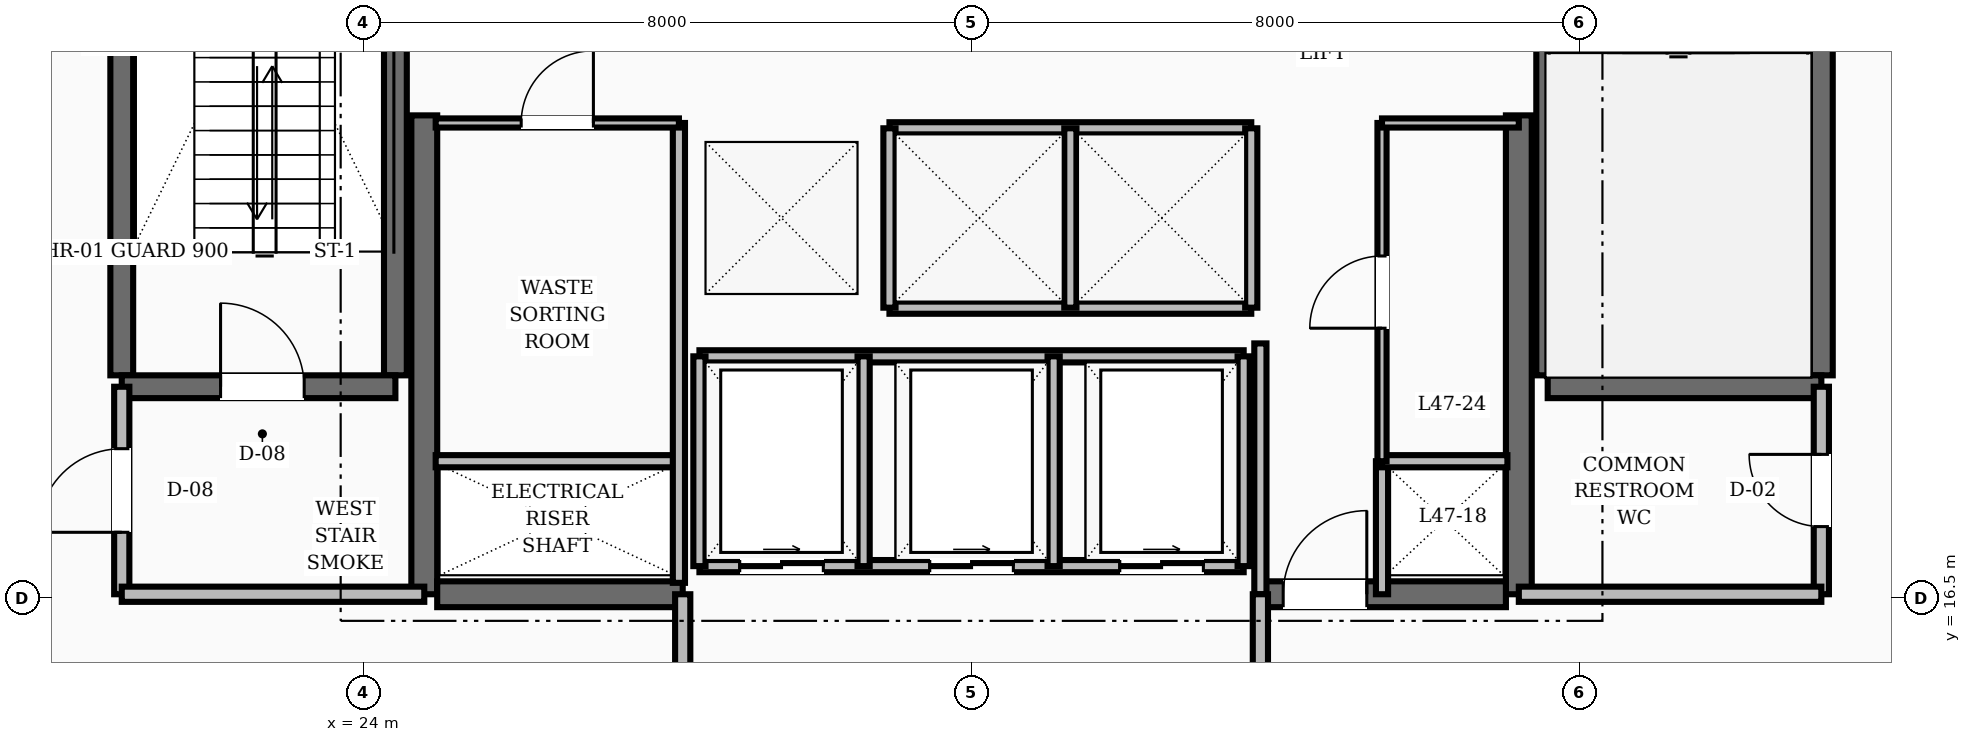
"""IFC4 building model, lengths in metres.
Left out: names, types, materials, properties, quantities, classifications, styles, units other than length and angle.
Written with IfcOpenShell. Run it as: python <this file> out.ifc"""

import sys

from ifc_helpers import new_model, si_unit, direction, frame, frame_2d, origin, place, context, subcontext, project, spatial, rectangle, extrude, element, fill, save


model = new_model("IFC4")
c1 = context("Model", 3, precision=1e-05, world=origin(), true_north=direction((0.0, 1.0)))
c2 = subcontext(c1, "Body", "Model", "MODEL_VIEW")
j1 = project(units=[si_unit("LENGTHUNIT", "METRE"), si_unit("PLANEANGLEUNIT", "RADIAN")], contexts=[c1])
p1 = place(None, origin())
s1 = spatial("IfcSite", under=j1, at=p1, CompositionType="ELEMENT")
p2 = place(p1, origin())
s2 = spatial("IfcBuilding", under=s1, at=p2, CompositionType="ELEMENT")
p3 = place(p2, frame((0.0, 0.0, 182.0)))
s3 = spatial("IfcBuildingStorey", under=s2, at=p3, CompositionType="ELEMENT", Elevation=182.0)
for number, where, z_axis, x_axis in (
    (1, (24.8, 16.55, 0.0), (0.0, 0.0, 1.0), (0.0, 1.0, 0.0)),
    (2, (39.2, 16.55, 0.0), (0.0, 0.0, 1.0), (0.0, 1.0, 0.0)),
):
    element("IfcWall", number, at=place(p3, frame(where, z_axis=z_axis, x_axis=x_axis)), inside=s3, PredefinedType="SHEAR", context=c2, shape_type="SweptSolid", body=[
        extrude(rectangle(XDim=6.3, YDim=0.34, at=frame_2d((3.15, 0.0))), origin(), (0.0, 0.0, 1.0), 3.6),
    ])
p4 = place(p3, frame((24.97, 16.55, 0.0), z_axis=(0.0, 0.0, 1.0), x_axis=(1.0, 0.0, 0.0)))
e3 = element("IfcWall", 3, at=p4, inside=s3, PredefinedType="SHEAR", context=c2, shape_type="SweptSolid", body=[
    extrude(rectangle(XDim=3.23, YDim=0.34, at=frame_2d((1.615, 0.0))), origin(), (0.0, 0.0, 1.0), 3.6),
])
p5 = place(p3, frame((35.8, 16.55, 0.0), z_axis=(0.0, 0.0, 1.0), x_axis=(1.0, 0.0, 0.0)))
e4 = element("IfcWall", 4, at=p5, inside=s3, PredefinedType="SHEAR", context=c2, shape_type="SweptSolid", body=[
    extrude(rectangle(XDim=3.23, YDim=0.34, at=frame_2d((1.615, 0.0))), origin(), (0.0, 0.0, 1.0), 3.6),
])
p6 = place(p5, frame((0.3, 0.0, 0.0)))
e5 = element("IfcOpeningElement", 5, at=p6, cuts=e4, PredefinedType="OPENING", context=c2, shape_type="SweptSolid", body=[
    extrude(rectangle(XDim=1.1, YDim=2.1, at=frame_2d((0.55, 1.05))), frame((0.0, 0.18, 0.0), z_axis=(0.0, -1.0, 0.0), x_axis=(1.0, 0.0, 0.0)), (0.0, 0.0, 1.0), 0.36),
])
for number, where, z_axis, x_axis in (
    (6, (20.82, 19.43, 0.0), (0.0, 0.0, 1.0), (0.0, 1.0, 0.0)),
    (7, (24.42, 19.43, 0.0), (0.0, 0.0, 1.0), (0.0, 1.0, 0.0)),
):
    element("IfcWall", number, at=place(p3, frame(where, z_axis=z_axis, x_axis=x_axis)), inside=s3, PredefinedType="SHEAR", context=c2, shape_type="SweptSolid", body=[
        extrude(rectangle(XDim=8.74, YDim=0.3, at=frame_2d((4.37, 0.0))), origin(), (0.0, 0.0, 1.0), 3.6),
    ])
p7 = place(p3, frame((20.82, 19.28, 0.0), z_axis=(0.0, 0.0, 1.0), x_axis=(1.0, 0.0, 0.0)))
e8 = element("IfcWall", 8, at=p7, inside=s3, PredefinedType="SHEAR", context=c2, shape_type="SweptSolid", body=[
    extrude(rectangle(XDim=3.6, YDim=0.3, at=frame_2d((1.8, 0.0))), origin(), (0.0, 0.0, 1.0), 3.6),
])
p8 = place(p7, frame((1.3, 0.0, 0.0)))
e9 = element("IfcOpeningElement", 9, at=p8, cuts=e8, PredefinedType="OPENING", context=c2, shape_type="SweptSolid", body=[
    extrude(rectangle(XDim=1.1, YDim=2.1, at=frame_2d((0.55, 1.05))), frame((0.0, 0.16, 0.0), z_axis=(0.0, -1.0, 0.0), x_axis=(1.0, 0.0, 0.0)), (0.0, 0.0, 1.0), 0.32),
])
for number, where, z_axis, x_axis in (
    (10, (43.18, 19.43, 0.0), (0.0, 0.0, 1.0), (0.0, 1.0, 0.0)),
    (11, (39.58, 19.43, 0.0), (0.0, 0.0, 1.0), (0.0, 1.0, 0.0)),
):
    element("IfcWall", number, at=place(p3, frame(where, z_axis=z_axis, x_axis=x_axis)), inside=s3, PredefinedType="SHEAR", context=c2, shape_type="SweptSolid", body=[
        extrude(rectangle(XDim=8.74, YDim=0.3, at=frame_2d((4.37, 0.0))), origin(), (0.0, 0.0, 1.0), 3.6),
    ])
p9 = place(p3, frame((39.58, 19.28, 0.0), z_axis=(0.0, 0.0, 1.0), x_axis=(1.0, 0.0, 0.0)))
e12 = element("IfcWall", 12, at=p9, inside=s3, PredefinedType="SHEAR", context=c2, shape_type="SweptSolid", body=[
    extrude(rectangle(XDim=3.6, YDim=0.3, at=frame_2d((1.8, 0.0))), origin(), (0.0, 0.0, 1.0), 3.6),
])
p10 = place(p3, frame((20.82, 16.55, 0.0), z_axis=(0.0, 0.0, 1.0), x_axis=(0.0, 1.0, 0.0)))
e13 = element("IfcWall", 13, at=p10, inside=s3, PredefinedType="SOLIDWALL", context=c2, shape_type="SweptSolid", body=[
    extrude(rectangle(XDim=2.73, YDim=0.2, at=frame_2d((1.365, 0.0))), origin(), (0.0, 0.0, 1.0), 2.8),
])
p11 = place(p10, frame((0.815, 0.0, 0.0)))
e14 = element("IfcOpeningElement", 14, at=p11, cuts=e13, PredefinedType="OPENING", context=c2, shape_type="SweptSolid", body=[
    extrude(rectangle(XDim=1.1, YDim=2.1, at=frame_2d((0.55, 1.05))), frame((0.0, 0.11, 0.0), z_axis=(0.0, -1.0, 0.0), x_axis=(1.0, 0.0, 0.0)), (0.0, 0.0, 1.0), 0.22),
])
p12 = place(p3, frame((20.82, 16.55, 0.0), z_axis=(0.0, 0.0, 1.0), x_axis=(1.0, 0.0, 0.0)))
e15 = element("IfcWall", 15, at=p12, inside=s3, PredefinedType="SOLIDWALL", context=c2, shape_type="SweptSolid", body=[
    extrude(rectangle(XDim=3.98, YDim=0.2, at=frame_2d((1.99, 0.0))), origin(), (0.0, 0.0, 1.0), 2.8),
])
p13 = place(p3, frame((43.18, 16.55, 0.0), z_axis=(0.0, 0.0, 1.0), x_axis=(0.0, 1.0, 0.0)))
e16 = element("IfcWall", 16, at=p13, inside=s3, PredefinedType="SOLIDWALL", context=c2, shape_type="SweptSolid", body=[
    extrude(rectangle(XDim=2.73, YDim=0.2, at=frame_2d((1.365, 0.0))), origin(), (0.0, 0.0, 1.0), 2.8),
])
p14 = place(p13, frame((0.89, 0.0, 0.0)))
e17 = element("IfcOpeningElement", 17, at=p14, cuts=e16, PredefinedType="OPENING", context=c2, shape_type="SweptSolid", body=[
    extrude(rectangle(XDim=0.95, YDim=2.1, at=frame_2d((0.475, 1.05))), frame((0.0, 0.11, 0.0), z_axis=(0.0, -1.0, 0.0), x_axis=(1.0, 0.0, 0.0)), (0.0, 0.0, 1.0), 0.22),
])
p15 = place(p3, frame((39.2, 16.55, 0.0), z_axis=(0.0, 0.0, 1.0), x_axis=(1.0, 0.0, 0.0)))
e18 = element("IfcWall", 18, at=p15, inside=s3, PredefinedType="SOLIDWALL", context=c2, shape_type="SweptSolid", body=[
    extrude(rectangle(XDim=3.98, YDim=0.2, at=frame_2d((1.99, 0.0))), origin(), (0.0, 0.0, 1.0), 2.8),
])
p16 = place(p3, frame((35.8, 16.55, 0.0), z_axis=(0.0, 0.0, 1.0), x_axis=(0.0, 1.0, 0.0)))
e19 = element("IfcWall", 19, at=p16, inside=s3, PredefinedType="SOLIDWALL", context=c2, shape_type="SweptSolid", body=[
    extrude(rectangle(XDim=3.3, YDim=0.16, at=frame_2d((1.65, 0.0))), origin(), (0.0, 0.0, 1.0), 2.8),
])
p17 = place(p3, frame((37.4, 16.55, 0.0), z_axis=(0.0, 0.0, 1.0), x_axis=(0.0, 1.0, 0.0)))
e20 = element("IfcWall", 20, at=p17, inside=s3, PredefinedType="SOLIDWALL", context=c2, shape_type="SweptSolid", body=[
    extrude(rectangle(XDim=1.75, YDim=0.16, at=frame_2d((0.875, 0.0))), origin(), (0.0, 0.0, 1.0), 2.8),
])
for number, where, z_axis, x_axis in (
    (21, (28.2, 14.35, 0.0), (0.0, 0.0, 1.0), (0.0, 1.0, 0.0)),
    (22, (35.8, 14.35, 0.0), (0.0, 0.0, 1.0), (0.0, 1.0, 0.0)),
):
    element("IfcWall", number, at=place(p3, frame(where, z_axis=z_axis, x_axis=x_axis)), inside=s3, PredefinedType="SOLIDWALL", context=c2, shape_type="SweptSolid", body=[
        extrude(rectangle(XDim=2.2, YDim=0.2, at=frame_2d((1.1, 0.0))), origin(), (0.0, 0.0, 1.0), 2.8),
    ])
for number, where, z_axis, x_axis in (
    (23, (30.92, 22.68, 0.0), (0.0, 0.0, 1.0), (1.0, 0.0, 0.0)),
    (24, (30.92, 20.32, 0.0), (0.0, 0.0, 1.0), (1.0, 0.0, 0.0)),
):
    element("IfcWall", number, at=place(p3, frame(where, z_axis=z_axis, x_axis=x_axis)), inside=s3, PredefinedType="SOLIDWALL", context=c2, shape_type="SweptSolid", body=[
        extrude(rectangle(XDim=4.76, YDim=0.16, at=frame_2d((2.38, 0.0))), origin(), (0.0, 0.0, 1.0), 2.8),
    ])
for number, where, z_axis, x_axis in (
    (25, (30.92, 20.32, 0.0), (0.0, 0.0, 1.0), (0.0, 1.0, 0.0)),
    (26, (33.3, 20.32, 0.0), (0.0, 0.0, 1.0), (0.0, 1.0, 0.0)),
    (27, (35.68, 20.32, 0.0), (0.0, 0.0, 1.0), (0.0, 1.0, 0.0)),
):
    element("IfcWall", number, at=place(p3, frame(where, z_axis=z_axis, x_axis=x_axis)), inside=s3, PredefinedType="SOLIDWALL", context=c2, shape_type="SweptSolid", body=[
        extrude(rectangle(XDim=2.36, YDim=0.16, at=frame_2d((1.18, 0.0))), origin(), (0.0, 0.0, 1.0), 2.8),
    ])
p18 = place(p3, frame((28.42, 16.92, 0.0), z_axis=(0.0, 0.0, 1.0), x_axis=(1.0, 0.0, 0.0)))
e28 = element("IfcWall", 28, at=p18, inside=s3, PredefinedType="SOLIDWALL", context=c2, shape_type="SweptSolid", body=[
    extrude(rectangle(XDim=7.16, YDim=0.16, at=frame_2d((3.58, 0.0))), origin(), (0.0, 0.0, 1.0), 2.8),
])
p19 = place(p18, frame((0.53, 0.0, 0.0)))
e29 = element("IfcOpeningElement", 29, at=p19, cuts=e28, PredefinedType="OPENING", context=c2, shape_type="SweptSolid", body=[
    extrude(rectangle(XDim=1.1, YDim=2.15, at=frame_2d((0.55, 1.075))), frame((0.0, 0.09, 0.0), z_axis=(0.0, -1.0, 0.0), x_axis=(1.0, 0.0, 0.0)), (0.0, 0.0, 1.0), 0.18),
])
p20 = place(p18, frame((3.03, 0.0, 0.0)))
e30 = element("IfcOpeningElement", 30, at=p20, cuts=e28, PredefinedType="OPENING", context=c2, shape_type="SweptSolid", body=[
    extrude(rectangle(XDim=1.1, YDim=2.15, at=frame_2d((0.55, 1.075))), frame((0.0, 0.09, 0.0), z_axis=(0.0, -1.0, 0.0), x_axis=(1.0, 0.0, 0.0)), (0.0, 0.0, 1.0), 0.18),
])
p21 = place(p18, frame((5.53, 0.0, 0.0)))
e31 = element("IfcOpeningElement", 31, at=p21, cuts=e28, PredefinedType="OPENING", context=c2, shape_type="SweptSolid", body=[
    extrude(rectangle(XDim=1.1, YDim=2.15, at=frame_2d((0.55, 1.075))), frame((0.0, 0.09, 0.0), z_axis=(0.0, -1.0, 0.0), x_axis=(1.0, 0.0, 0.0)), (0.0, 0.0, 1.0), 0.18),
])
p22 = place(p3, frame((28.42, 19.68, 0.0), z_axis=(0.0, 0.0, 1.0), x_axis=(1.0, 0.0, 0.0)))
e32 = element("IfcWall", 32, at=p22, inside=s3, PredefinedType="SOLIDWALL", context=c2, shape_type="SweptSolid", body=[
    extrude(rectangle(XDim=7.16, YDim=0.16, at=frame_2d((3.58, 0.0))), origin(), (0.0, 0.0, 1.0), 2.8),
])
for number, where, z_axis, x_axis in (
    (33, (28.42, 16.92, 0.0), (0.0, 0.0, 1.0), (0.0, 1.0, 0.0)),
    (34, (30.58, 16.92, 0.0), (0.0, 0.0, 1.0), (0.0, 1.0, 0.0)),
    (35, (33.08, 16.92, 0.0), (0.0, 0.0, 1.0), (0.0, 1.0, 0.0)),
    (36, (35.58, 16.92, 0.0), (0.0, 0.0, 1.0), (0.0, 1.0, 0.0)),
):
    element("IfcWall", number, at=place(p3, frame(where, z_axis=z_axis, x_axis=x_axis)), inside=s3, PredefinedType="SOLIDWALL", context=c2, shape_type="SweptSolid", body=[
        extrude(rectangle(XDim=2.76, YDim=0.16, at=frame_2d((1.38, 0.0))), origin(), (0.0, 0.0, 1.0), 2.8),
    ])
p23 = place(p3, frame((24.95, 18.3, 0.0), z_axis=(0.0, 0.0, 1.0), x_axis=(1.0, 0.0, 0.0)))
e37 = element("IfcWall", 37, at=p23, inside=s3, PredefinedType="SOLIDWALL", context=c2, shape_type="SweptSolid", body=[
    extrude(rectangle(XDim=3.2, YDim=0.16, at=frame_2d((1.6, 0.0))), origin(), (0.0, 0.0, 1.0), 2.8),
])
p24 = place(p3, frame((28.15, 16.7, 0.0), z_axis=(0.0, 0.0, 1.0), x_axis=(0.0, 1.0, 0.0)))
e38 = element("IfcWall", 38, at=p24, inside=s3, PredefinedType="SOLIDWALL", context=c2, shape_type="SweptSolid", body=[
    extrude(rectangle(XDim=6.05, YDim=0.16, at=frame_2d((3.025, 0.0))), origin(), (0.0, 0.0, 1.0), 2.8),
])
p25 = place(p3, frame((37.4, 18.3, 0.0), z_axis=(0.0, 0.0, 1.0), x_axis=(1.0, 0.0, 0.0)))
e39 = element("IfcWall", 39, at=p25, inside=s3, PredefinedType="SOLIDWALL", context=c2, shape_type="SweptSolid", body=[
    extrude(rectangle(XDim=1.65, YDim=0.16, at=frame_2d((0.825, 0.0))), origin(), (0.0, 0.0, 1.0), 2.8),
])
p26 = place(p3, frame((24.95, 22.75, 0.0), z_axis=(0.0, 0.0, 1.0), x_axis=(1.0, 0.0, 0.0)))
e40 = element("IfcWall", 40, at=p26, inside=s3, PredefinedType="PARTITIONING", context=c2, shape_type="SweptSolid", body=[
    extrude(rectangle(XDim=3.2, YDim=0.12, at=frame_2d((1.6, 0.0))), origin(), (0.0, 0.0, 1.0), 2.8),
])
p27 = place(p26, frame((1.125, 0.0, 0.0)))
e41 = element("IfcOpeningElement", 41, at=p27, cuts=e40, PredefinedType="OPENING", context=c2, shape_type="SweptSolid", body=[
    extrude(rectangle(XDim=0.95, YDim=2.1, at=frame_2d((0.475, 1.05))), frame((0.0, 0.07, 0.0), z_axis=(0.0, -1.0, 0.0), x_axis=(1.0, 0.0, 0.0)), (0.0, 0.0, 1.0), 0.14),
])
p28 = place(p3, frame((37.4, 18.3, 0.0), z_axis=(0.0, 0.0, 1.0), x_axis=(0.0, 1.0, 0.0)))
e42 = element("IfcWall", 42, at=p28, inside=s3, PredefinedType="PARTITIONING", context=c2, shape_type="SweptSolid", body=[
    extrude(rectangle(XDim=4.45, YDim=0.12, at=frame_2d((2.225, 0.0))), origin(), (0.0, 0.0, 1.0), 2.8),
])
p29 = place(p28, frame((1.75, 0.0, 0.0)))
e43 = element("IfcOpeningElement", 43, at=p29, cuts=e42, PredefinedType="OPENING", context=c2, shape_type="SweptSolid", body=[
    extrude(rectangle(XDim=0.95, YDim=2.1, at=frame_2d((0.475, 1.05))), frame((0.0, 0.07, 0.0), z_axis=(0.0, -1.0, 0.0), x_axis=(1.0, 0.0, 0.0)), (0.0, 0.0, 1.0), 0.14),
])
p30 = place(p3, frame((37.4, 22.75, 0.0), z_axis=(0.0, 0.0, 1.0), x_axis=(1.0, 0.0, 0.0)))
e44 = element("IfcWall", 44, at=p30, inside=s3, PredefinedType="PARTITIONING", context=c2, shape_type="SweptSolid", body=[
    extrude(rectangle(XDim=1.8, YDim=0.12, at=frame_2d((0.9, 0.0))), origin(), (0.0, 0.0, 1.0), 2.8),
])
p31 = place(p8, origin())
e45 = element("IfcDoor", 45, at=p31, inside=s3, OperationType="SINGLE_SWING_LEFT", PredefinedType="DOOR", context=c2, shape_type="SweptSolid", body=[
    extrude(rectangle(XDim=1.1, YDim=2.1, at=frame_2d((0.55, 1.05))), frame((0.0, 0.025, 0.0), z_axis=(0.0, -1.0, 0.0), x_axis=(1.0, 0.0, 0.0)), (0.0, 0.0, 1.0), 0.05),
])
fill(e9, e45)
p32 = place(p11, origin())
e46 = element("IfcDoor", 46, at=p32, inside=s3, OperationType="SINGLE_SWING_LEFT", PredefinedType="DOOR", context=c2, shape_type="SweptSolid", body=[
    extrude(rectangle(XDim=1.1, YDim=2.1, at=frame_2d((0.55, 1.05))), frame((0.0, 0.025, 0.0), z_axis=(0.0, -1.0, 0.0), x_axis=(1.0, 0.0, 0.0)), (0.0, 0.0, 1.0), 0.05),
])
fill(e14, e46)
p33 = place(p14, origin())
e47 = element("IfcDoor", 47, at=p33, inside=s3, OperationType="SINGLE_SWING_RIGHT", PredefinedType="DOOR", context=c2, shape_type="SweptSolid", body=[
    extrude(rectangle(XDim=0.95, YDim=2.1, at=frame_2d((0.475, 1.05))), frame((0.0, 0.025, 0.0), z_axis=(0.0, -1.0, 0.0), x_axis=(1.0, 0.0, 0.0)), (0.0, 0.0, 1.0), 0.05),
])
fill(e17, e47)
p34 = place(p6, origin())
e48 = element("IfcDoor", 48, at=p34, inside=s3, OperationType="SINGLE_SWING_RIGHT", PredefinedType="DOOR", context=c2, shape_type="SweptSolid", body=[
    extrude(rectangle(XDim=1.1, YDim=2.1, at=frame_2d((0.55, 1.05))), frame((0.0, 0.025, 0.0), z_axis=(0.0, -1.0, 0.0), x_axis=(1.0, 0.0, 0.0)), (0.0, 0.0, 1.0), 0.05),
])
fill(e5, e48)
p35 = place(p19, origin())
e49 = element("IfcDoor", 49, at=p35, inside=s3, OperationType="SLIDING_TO_RIGHT", PredefinedType="DOOR", context=c2, shape_type="SweptSolid", body=[
    extrude(rectangle(XDim=1.1, YDim=2.15, at=frame_2d((0.55, 1.075))), frame((0.0, 0.025, 0.0), z_axis=(0.0, -1.0, 0.0), x_axis=(1.0, 0.0, 0.0)), (0.0, 0.0, 1.0), 0.05),
])
fill(e29, e49)
p36 = place(p20, origin())
e50 = element("IfcDoor", 50, at=p36, inside=s3, OperationType="SLIDING_TO_RIGHT", PredefinedType="DOOR", context=c2, shape_type="SweptSolid", body=[
    extrude(rectangle(XDim=1.1, YDim=2.15, at=frame_2d((0.55, 1.075))), frame((0.0, 0.025, 0.0), z_axis=(0.0, -1.0, 0.0), x_axis=(1.0, 0.0, 0.0)), (0.0, 0.0, 1.0), 0.05),
])
fill(e30, e50)
p37 = place(p21, origin())
e51 = element("IfcDoor", 51, at=p37, inside=s3, OperationType="SLIDING_TO_RIGHT", PredefinedType="DOOR", context=c2, shape_type="SweptSolid", body=[
    extrude(rectangle(XDim=1.1, YDim=2.15, at=frame_2d((0.55, 1.075))), frame((0.0, 0.025, 0.0), z_axis=(0.0, -1.0, 0.0), x_axis=(1.0, 0.0, 0.0)), (0.0, 0.0, 1.0), 0.05),
])
fill(e31, e51)
p38 = place(p27, origin())
e52 = element("IfcDoor", 52, at=p38, inside=s3, OperationType="SINGLE_SWING_RIGHT", PredefinedType="DOOR", context=c2, shape_type="SweptSolid", body=[
    extrude(rectangle(XDim=0.95, YDim=2.1, at=frame_2d((0.475, 1.05))), frame((0.0, 0.025, 0.0), z_axis=(0.0, -1.0, 0.0), x_axis=(1.0, 0.0, 0.0)), (0.0, 0.0, 1.0), 0.05),
])
fill(e41, e52)
p39 = place(p29, origin())
e53 = element("IfcDoor", 53, at=p39, inside=s3, OperationType="SINGLE_SWING_LEFT", PredefinedType="DOOR", context=c2, shape_type="SweptSolid", body=[
    extrude(rectangle(XDim=0.95, YDim=2.1, at=frame_2d((0.475, 1.05))), frame((0.0, 0.025, 0.0), z_axis=(0.0, -1.0, 0.0), x_axis=(1.0, 0.0, 0.0)), (0.0, 0.0, 1.0), 0.05),
])
fill(e43, e53)
save(model, sys.argv[1])
